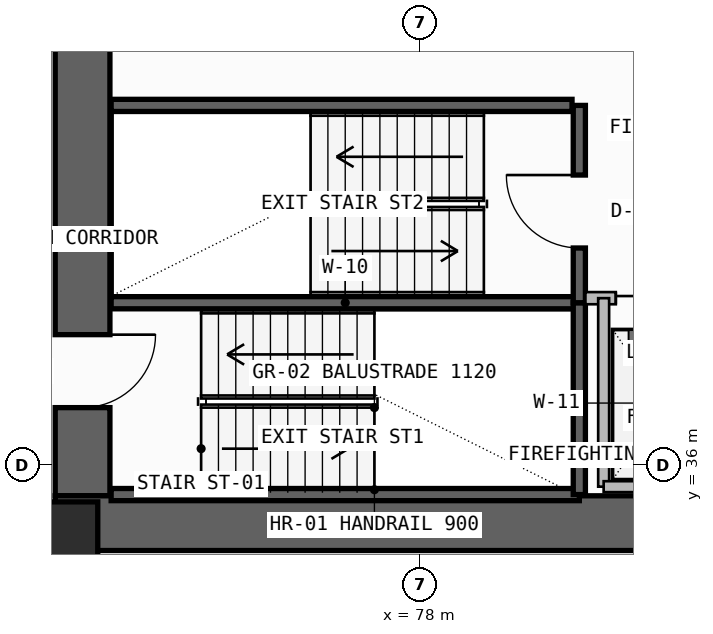
"""IFC4 building model, lengths in metres.
Left out: names, types, materials, properties, quantities, classifications, styles, units other than length and angle.
Written with IfcOpenShell. Run it as: python <this file> out.ifc"""

import sys

from ifc_helpers import new_model, si_unit, direction, frame, frame_2d, origin, origin_2d, place, context, subcontext, project, spatial, rectangle, extrude, element, fill, save


model = new_model("IFC4")
c1 = context("Model", 3, precision=1e-05, world=origin(), true_north=direction((0.0, 1.0)))
c2 = subcontext(c1, "Body", "Model", "MODEL_VIEW")
j1 = project(units=[si_unit("LENGTHUNIT", "METRE"), si_unit("PLANEANGLEUNIT", "RADIAN")], contexts=[c1])
p1 = place(None, origin())
s1 = spatial("IfcSite", under=j1, at=p1, CompositionType="ELEMENT")
p2 = place(p1, origin())
s2 = spatial("IfcBuilding", under=s1, at=p2, CompositionType="ELEMENT")
p3 = place(p2, frame((0.0, 0.0, 150.3)))
s3 = spatial("IfcBuildingStorey", under=s2, at=p3, CompositionType="ELEMENT", Elevation=150.3)
p4 = place(p3, frame((72.45, 35.5, -0.26), z_axis=(0.0, 0.0, 1.0), x_axis=(0.0, 1.0, 0.0)))
e1 = element("IfcWall", 1, at=p4, inside=s3, PredefinedType="SHEAR", context=c2, shape_type="SweptSolid", body=[
    extrude(rectangle(XDim=7.85, YDim=0.9, at=frame_2d((3.925, 0.0))), origin(), (0.0, 0.0, 1.0), 3.6),
])
p5 = place(p4, frame((1.45, 0.0, 0.26)))
e2 = element("IfcOpeningElement", 2, at=p5, cuts=e1, PredefinedType="OPENING", context=c2, shape_type="SweptSolid", body=[
    extrude(rectangle(XDim=1.2, YDim=2.2, at=frame_2d((0.6, 1.1))), frame((0.0, 0.46, 0.0), z_axis=(0.0, -1.0, 0.0), x_axis=(1.0, 0.0, 0.0)), (0.0, 0.0, 1.0), 0.92),
])
p6 = place(p3, frame((72.0, 35.05, -0.26), z_axis=(0.0, 0.0, 1.0), x_axis=(1.0, 0.0, 0.0)))
e3 = element("IfcWall", 3, at=p6, inside=s3, PredefinedType="SHEAR", context=c2, shape_type="SweptSolid", body=[
    extrude(rectangle(XDim=13.9, YDim=0.9, at=frame_2d((6.95, 0.0))), origin(), (0.0, 0.0, 1.0), 3.6),
])
p7 = place(p3, frame((72.0, 34.7, 0.0), z_axis=(0.0, 0.0, 1.0), x_axis=(1.0, 0.0, 0.0)))
e4 = element("IfcColumn", 4, at=p7, inside=s3, PredefinedType="COLUMN", context=c2, shape_type="SweptSolid", body=[
    extrude(rectangle(XDim=1.4, YDim=1.4, at=origin_2d()), origin(), (0.0, 0.0, 1.0), 3.6),
])
for number, where, z_axis, x_axis in (
    (5, (72.92, 35.52, -0.26), (0.0, 0.0, 1.0), (1.0, 0.0, 0.0)),
    (6, (72.92, 38.675, -0.26), (0.0, 0.0, 1.0), (1.0, 0.0, 0.0)),
):
    element("IfcWall", number, at=place(p3, frame(where, z_axis=z_axis, x_axis=x_axis)), inside=s3, PredefinedType="SOLIDWALL", context=c2, shape_type="SweptSolid", body=[
        extrude(rectangle(XDim=7.7, YDim=0.2, at=frame_2d((3.85, 0.0))), origin(), (0.0, 0.0, 1.0), 3.6),
    ])
p8 = place(p3, frame((80.62, 35.52, -0.26), z_axis=(0.0, 0.0, 1.0), x_axis=(0.0, 1.0, 0.0)))
e7 = element("IfcWall", 7, at=p8, inside=s3, PredefinedType="SOLIDWALL", context=c2, shape_type="SweptSolid", body=[
    extrude(rectangle(XDim=3.155, YDim=0.2, at=frame_2d((1.578, 0.0))), origin(), (0.0, 0.0, 1.0), 3.6),
])
p9 = place(p3, frame((80.62, 38.675, -0.26), z_axis=(0.0, 0.0, 1.0), x_axis=(0.0, 1.0, 0.0)))
e8 = element("IfcWall", 8, at=p9, inside=s3, PredefinedType="SOLIDWALL", context=c2, shape_type="SweptSolid", body=[
    extrude(rectangle(XDim=3.245, YDim=0.2, at=frame_2d((1.623, 0.0))), origin(), (0.0, 0.0, 1.0), 3.6),
])
p10 = place(p9, frame((0.9, 0.0, 0.26)))
e9 = element("IfcOpeningElement", 9, at=p10, cuts=e8, PredefinedType="OPENING", context=c2, shape_type="SweptSolid", body=[
    extrude(rectangle(XDim=1.2, YDim=2.2, at=frame_2d((0.6, 1.1))), frame((0.0, 0.11, 0.0), z_axis=(0.0, -1.0, 0.0), x_axis=(1.0, 0.0, 0.0)), (0.0, 0.0, 1.0), 0.22),
])
p11 = place(p3, frame((80.72, 38.75, 0.0), z_axis=(0.0, 0.0, 1.0), x_axis=(1.0, 0.0, 0.0)))
e10 = element("IfcWall", 10, at=p11, inside=s3, PredefinedType="SOLIDWALL", context=c2, shape_type="SweptSolid", body=[
    extrude(rectangle(XDim=4.26, YDim=0.2, at=frame_2d((2.13, 0.0))), origin(), (0.0, 0.0, 1.0), 3.34),
])
p12 = place(p11, frame((0.5, 0.0, 0.0)))
e11 = element("IfcOpeningElement", 11, at=p12, cuts=e10, PredefinedType="OPENING", context=c2, shape_type="SweptSolid", body=[
    extrude(rectangle(XDim=1.3, YDim=2.3, at=frame_2d((0.65, 1.15))), frame((0.0, 0.11, 0.0), z_axis=(0.0, -1.0, 0.0), x_axis=(1.0, 0.0, 0.0)), (0.0, 0.0, 1.0), 0.22),
])
p13 = place(p11, frame((2.45, 0.0, 0.0)))
e12 = element("IfcOpeningElement", 12, at=p13, cuts=e10, PredefinedType="OPENING", context=c2, shape_type="SweptSolid", body=[
    extrude(rectangle(XDim=1.3, YDim=2.3, at=frame_2d((0.65, 1.15))), frame((0.0, 0.11, 0.0), z_axis=(0.0, -1.0, 0.0), x_axis=(1.0, 0.0, 0.0)), (0.0, 0.0, 1.0), 0.22),
])
p14 = place(p3, frame((81.02, 35.65, 0.0), z_axis=(0.0, 0.0, 1.0), x_axis=(0.0, 1.0, 0.0)))
e13 = element("IfcWall", 13, at=p14, inside=s3, PredefinedType="SOLIDWALL", context=c2, shape_type="SweptSolid", body=[
    extrude(rectangle(XDim=3.1, YDim=0.18, at=frame_2d((1.55, 0.0))), origin(), (0.0, 0.0, 1.0), 3.34),
])
p15 = place(p3, frame((81.02, 35.65, 0.0), z_axis=(0.0, 0.0, 1.0), x_axis=(1.0, 0.0, 0.0)))
e14 = element("IfcWall", 14, at=p15, inside=s3, PredefinedType="SOLIDWALL", context=c2, shape_type="SweptSolid", body=[
    extrude(rectangle(XDim=3.93, YDim=0.18, at=frame_2d((1.965, 0.0))), origin(), (0.0, 0.0, 1.0), 3.34),
])
p16 = place(p3, frame((72.92, 41.92, -0.26), z_axis=(0.0, 0.0, 1.0), x_axis=(1.0, 0.0, 0.0)))
e15 = element("IfcWall", 15, at=p16, inside=s3, PredefinedType="SOLIDWALL", context=c2, shape_type="SweptSolid", body=[
    extrude(rectangle(XDim=7.58, YDim=0.2, at=frame_2d((3.79, 0.0))), origin(), (0.0, 0.0, 1.0), 3.6),
])
p17 = place(p5, frame((1.2, 0.0, 0.0), z_axis=(0.0, 0.0, 1.0), x_axis=(-1.0, 0.0, 0.0)))
e16 = element("IfcDoor", 16, at=p17, inside=s3, OperationType="SINGLE_SWING_LEFT", PredefinedType="USERDEFINED", context=c2, shape_type="SweptSolid", body=[
    extrude(rectangle(XDim=1.2, YDim=2.2, at=frame_2d((0.6, 1.1))), frame((0.0, 0.025, 0.0), z_axis=(0.0, -1.0, 0.0), x_axis=(1.0, 0.0, 0.0)), (0.0, 0.0, 1.0), 0.05),
])
fill(e2, e16)
p18 = place(p10, origin())
e17 = element("IfcDoor", 17, at=p18, inside=s3, OperationType="SINGLE_SWING_RIGHT", PredefinedType="USERDEFINED", context=c2, shape_type="SweptSolid", body=[
    extrude(rectangle(XDim=1.2, YDim=2.2, at=frame_2d((0.6, 1.1))), frame((0.0, 0.025, 0.0), z_axis=(0.0, -1.0, 0.0), x_axis=(1.0, 0.0, 0.0)), (0.0, 0.0, 1.0), 0.05),
])
fill(e9, e17)
p19 = place(p12, origin())
e18 = element("IfcDoor", 18, at=p19, inside=s3, OperationType="DOUBLE_DOOR_SLIDING", PredefinedType="DOOR", context=c2, shape_type="SweptSolid", body=[
    extrude(rectangle(XDim=1.3, YDim=2.3, at=frame_2d((0.65, 1.15))), frame((0.0, 0.025, 0.0), z_axis=(0.0, -1.0, 0.0), x_axis=(1.0, 0.0, 0.0)), (0.0, 0.0, 1.0), 0.05),
])
fill(e11, e18)
save(model, sys.argv[1])
